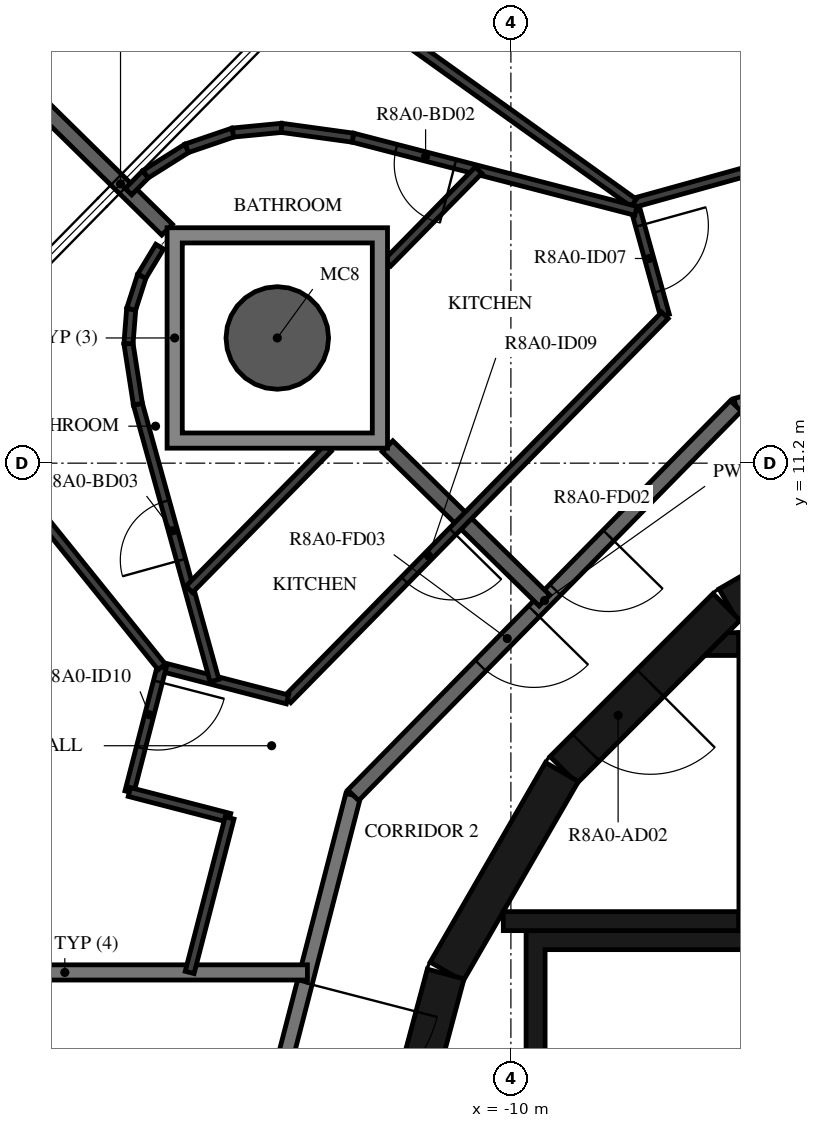
"""IFC4 building model, lengths in metres.
Left out: names, types, materials, properties, quantities, classifications, styles, units other than length and angle.
Written with IfcOpenShell. Run it as: python <this file> out.ifc"""

import sys

from ifc_helpers import new_model, si_unit, direction, frame, frame_2d, origin, origin_2d, place, context, subcontext, project, spatial, polyline, rectangle, hollow_circle, outline, extrude, element, fill, save


model = new_model("IFC4")
c1 = context("Model", 3, precision=1e-05, world=origin(), true_north=direction((0.0, 1.0)))
c2 = subcontext(c1, "Body", "Model", "MODEL_VIEW")
j1 = project(units=[si_unit("LENGTHUNIT", "METRE"), si_unit("PLANEANGLEUNIT", "RADIAN")], contexts=[c1])
p1 = place(None, origin())
s1 = spatial("IfcSite", under=j1, at=p1, CompositionType="ELEMENT")
p2 = place(p1, origin())
s2 = spatial("IfcBuilding", under=s1, at=p2, CompositionType="ELEMENT")
p3 = place(p2, frame((0.0, 0.0, 305.2)))
s3 = spatial("IfcBuildingStorey", under=s2, at=p3, CompositionType="ELEMENT", Elevation=305.2)
p4 = place(p3, frame((-13.073, 12.847, -0.38), z_axis=(0.0, 0.0, 1.0), x_axis=(1.0, 0.0, 0.0)))
e1 = element("IfcColumn", 1, at=p4, inside=s3, PredefinedType="COLUMN", context=c2, shape_type="SweptSolid", body=[
    extrude(hollow_circle(Radius=0.675, WallThickness=0.03, at=origin_2d()), origin(), (0.0, 0.0, 1.0), 3.5),
])
p5 = place(p3, frame((-4.51, 10.845, 0.0), z_axis=(0.0, 0.0, 1.0), x_axis=(-0.865975092491, -0.500087131594, 0.0)))
e2 = element("IfcWall", 2, at=p5, inside=s3, PredefinedType="SHEAR", context=c2, shape_type="SweptSolid", body=[
    extrude(rectangle(XDim=3.033, YDim=0.5, at=frame_2d((1.516, 0.0))), origin(), (0.0, 0.0, 1.0), 3.12),
])
p6 = place(p3, frame((-7.164, 9.308, 0.0), z_axis=(0.0, 0.0, 1.0), x_axis=(-0.707106781187, -0.707106781187, 0.0)))
e3 = element("IfcWall", 3, at=p6, inside=s3, PredefinedType="SHEAR", context=c2, shape_type="SweptSolid", body=[
    extrude(rectangle(XDim=3.032, YDim=0.5, at=frame_2d((1.516, 0.0))), origin(), (0.0, 0.0, 1.0), 3.12),
])
p7 = place(p6, frame((1.416, 0.0, 0.0)))
e4 = element("IfcOpeningElement", 4, at=p7, cuts=e3, PredefinedType="OPENING", context=c2, shape_type="SweptSolid", body=[
    extrude(rectangle(XDim=1.2, YDim=2.1, at=frame_2d((0.6, 1.05))), frame((0.0, 0.26, 0.0), z_axis=(0.0, -1.0, 0.0), x_axis=(1.0, 0.0, 0.0)), (0.0, 0.0, 1.0), 0.52),
])
for number, where, z_axis, x_axis in (
    (5, (-9.329, 7.137, 0.0), (0.0, 0.0, 1.0), (-0.5, -0.866, 0.0)),
    (6, (-10.858, 4.479, 0.0), (0.0, 0.0, 1.0), (-0.259, -0.966, 0.0)),
):
    element("IfcWall", number, at=place(p3, frame(where, z_axis=z_axis, x_axis=x_axis)), inside=s3, PredefinedType="SHEAR", context=c2, shape_type="SweptSolid", body=[
        extrude(rectangle(XDim=3.033, YDim=0.5, at=frame_2d((1.516, 0.0))), origin(), (0.0, 0.0, 1.0), 3.12),
    ])
p8 = place(p3, frame((-6.875, 8.97, 0.0), z_axis=(0.0, 0.0, 1.0), x_axis=(0.0, -1.0, 0.0)))
e7 = element("IfcWall", 7, at=p8, inside=s3, PredefinedType="SHEAR", context=c2, shape_type="SweptSolid", body=[
    extrude(rectangle(XDim=3.92, YDim=0.25, at=frame_2d((1.96, 0.0))), origin(), (0.0, 0.0, 1.0), 3.12),
])
p9 = place(p8, frame((1.61, 0.0, 0.0)))
e8 = element("IfcOpeningElement", 8, at=p9, cuts=e7, PredefinedType="OPENING", context=c2, shape_type="SweptSolid", body=[
    extrude(rectangle(XDim=1.2, YDim=2.1, at=frame_2d((0.6, 1.05))), frame((0.0, 0.135, 0.0), z_axis=(0.0, -1.0, 0.0), x_axis=(1.0, 0.0, 0.0)), (0.0, 0.0, 1.0), 0.27),
])
p10 = place(p3, frame((-7.0, 5.175, 0.0), z_axis=(0.0, 0.0, 1.0), x_axis=(-1.0, 0.0, 0.0)))
e9 = element("IfcWall", 9, at=p10, inside=s3, PredefinedType="SHEAR", context=c2, shape_type="SweptSolid", body=[
    extrude(rectangle(XDim=3.1, YDim=0.25, at=frame_2d((1.55, 0.0))), origin(), (0.0, 0.0, 1.0), 3.12),
])
p11 = place(p3, origin())
e10 = element("IfcWall", 10, at=p11, inside=s3, PredefinedType="SHEAR", context=c2, shape_type="SweptSolid", body=[
    extrude(outline(polyline([(-7.148, 8.97), (-7.0, 8.97), (-7.0, 8.67), (-7.448, 8.67), (-7.148, 8.97)])), origin(), (0.0, 0.0, 1.0), 3.12),
])
p12 = place(p3, origin())
e11 = element("IfcWall", 11, at=p12, inside=s3, PredefinedType="SHEAR", context=c2, shape_type="SweptSolid", body=[
    extrude(outline(polyline([(-9.8, 1.9), (-9.55, 1.9), (-9.55, 4.8), (-1.2, 4.8), (-1.2, 1.9), (-0.95, 1.9), (-0.95, 4.8), (3.1, 4.8), (3.1, 1.9), (3.35, 1.9), (3.35, 4.8), (5.25, 4.8), (5.25, 1.9), (5.5, 1.9), (5.5, 4.8), (7.4, 4.8), (7.4, 1.9), (7.65, 1.9), (7.65, 4.8), (9.55, 4.8), (9.55, 1.9), (9.8, 1.9), (9.8, 4.8), (9.8, 5.05), (-9.8, 5.05), (-9.8, 4.8), (-9.8, 1.9)])), origin(), (0.0, 0.0, 1.0), 3.12),
])
p13 = place(p3, frame((-0.121, 13.872, 0.0), z_axis=(0.0, 0.0, 1.0), x_axis=(-0.963625960674, -0.267254575108, 0.0)))
e12 = element("IfcWall", 12, at=p13, inside=s3, PredefinedType="STANDARD", context=c2, shape_type="SweptSolid", body=[
    extrude(rectangle(XDim=7.181, YDim=0.2, at=frame_2d((3.591, 0.0))), origin(), (0.0, 0.0, 1.0), 3.12),
])
p14 = place(p3, frame((-12.074, 6.831, 0.0), z_axis=(0.0, 0.0, 1.0), x_axis=(-0.250391063186, -0.968144780225, 0.0)))
e13 = element("IfcWall", 13, at=p14, inside=s3, PredefinedType="STANDARD", context=c2, shape_type="SweptSolid", body=[
    extrude(rectangle(XDim=7.181, YDim=0.2, at=frame_2d((3.591, 0.0))), origin(), (0.0, 0.0, 1.0), 3.12),
])
p15 = place(p14, frame((2.548, 0.0, 0.0)))
e14 = element("IfcOpeningElement", 14, at=p15, cuts=e13, PredefinedType="OPENING", context=c2, shape_type="SweptSolid", body=[
    extrude(rectangle(XDim=1.8, YDim=2.1, at=frame_2d((0.9, 1.05))), frame((0.0, 0.11, 0.0), z_axis=(0.0, -1.0, 0.0), x_axis=(1.0, 0.0, 0.0)), (0.0, 0.0, 1.0), 0.22),
])
p16 = place(p3, frame((-7.041, 11.953, 0.0), z_axis=(0.0, 0.0, 1.0), x_axis=(-0.70090916255, -0.713250549143, 0.0)))
e15 = element("IfcWall", 15, at=p16, inside=s3, PredefinedType="STANDARD", context=c2, shape_type="SweptSolid", body=[
    extrude(rectangle(XDim=7.181, YDim=0.2, at=frame_2d((3.59, 0.0))), origin(), (0.0, 0.0, 1.0), 3.12),
])
p17 = place(p16, frame((2.39, 0.0, 0.0)))
e16 = element("IfcOpeningElement", 16, at=p17, cuts=e15, PredefinedType="OPENING", context=c2, shape_type="SweptSolid", body=[
    extrude(rectangle(XDim=1.0, YDim=2.1, at=frame_2d((0.5, 1.05))), frame((0.0, 0.11, 0.0), z_axis=(0.0, -1.0, 0.0), x_axis=(1.0, 0.0, 0.0)), (0.0, 0.0, 1.0), 0.22),
])
p18 = place(p16, frame((3.791, 0.0, 0.0)))
e17 = element("IfcOpeningElement", 17, at=p18, cuts=e15, PredefinedType="OPENING", context=c2, shape_type="SweptSolid", body=[
    extrude(rectangle(XDim=1.0, YDim=2.1, at=frame_2d((0.5, 1.05))), frame((0.0, 0.11, 0.0), z_axis=(0.0, -1.0, 0.0), x_axis=(1.0, 0.0, 0.0)), (0.0, 0.0, 1.0), 0.22),
])
p19 = place(p3, frame((-12.677, 4.5, 0.0), z_axis=(0.0, 0.0, 1.0), x_axis=(-1.0, 0.0, 0.0)))
e18 = element("IfcWall", 18, at=p19, inside=s3, PredefinedType="STANDARD", context=c2, shape_type="SweptSolid", body=[
    extrude(rectangle(XDim=6.383, YDim=0.2, at=frame_2d((3.192, 0.0))), origin(), (0.0, 0.0, 1.0), 3.12),
])
p20 = place(p3, frame((-11.623, 11.422, 0.0), z_axis=(0.0, 0.0, 1.0), x_axis=(0.713233657229, -0.700926351478, 0.0)))
e19 = element("IfcWall", 19, at=p20, inside=s3, PredefinedType="STANDARD", context=c2, shape_type="SweptSolid", body=[
    extrude(rectangle(XDim=2.896, YDim=0.2, at=frame_2d((1.448, 0.0))), origin(), (0.0, 0.0, 1.0), 3.12),
])
p21 = place(p3, frame((-18.741, 18.417, 0.0), z_axis=(0.0, 0.0, 1.0), x_axis=(0.713252414586, -0.700907264256, 0.0)))
e20 = element("IfcWall", 20, at=p21, inside=s3, PredefinedType="STANDARD", context=c2, shape_type="SweptSolid", body=[
    extrude(rectangle(XDim=5.913, YDim=0.2, at=frame_2d((2.957, 0.0))), origin(), (0.0, 0.0, 1.0), 3.12),
])
p22 = place(p3, frame((-6.746, 15.079, 0.0), z_axis=(0.0, 0.0, 1.0), x_axis=(-0.963624820233, -0.267258687102, 0.0)))
e21 = element("IfcWall", 21, at=p22, inside=s3, PredefinedType="PARTITIONING", context=c2, shape_type="SweptSolid", body=[
    extrude(rectangle(XDim=1.7, YDim=0.12, at=frame_2d((0.85, 0.0))), origin(), (0.0, 0.0, 1.0), 3.12),
])
p23 = place(p3, frame((-8.355, 14.519, 0.0), z_axis=(0.0, 0.0, 1.0), x_axis=(0.267052638692, -0.963681943469, 0.0)))
e22 = element("IfcWall", 22, at=p23, inside=s3, PredefinedType="PARTITIONING", context=c2, shape_type="SweptSolid", body=[
    extrude(rectangle(XDim=1.427, YDim=0.12, at=frame_2d((0.713, 0.0))), origin(), (0.0, 0.0, 1.0), 3.12),
])
p24 = place(p23, frame((0.2, 0.0, 0.0)))
e23 = element("IfcOpeningElement", 23, at=p24, cuts=e22, PredefinedType="OPENING", context=c2, shape_type="SweptSolid", body=[
    extrude(rectangle(XDim=0.9, YDim=2.1, at=frame_2d((0.45, 1.05))), frame((0.0, 0.07, 0.0), z_axis=(0.0, -1.0, 0.0), x_axis=(1.0, 0.0, 0.0)), (0.0, 0.0, 1.0), 0.14),
])
p25 = place(p3, frame((-7.974, 13.144, 0.0), z_axis=(0.0, 0.0, 1.0), x_axis=(-0.700910366085, -0.713249366432, 0.0)))
e24 = element("IfcWall", 24, at=p25, inside=s3, PredefinedType="PARTITIONING", context=c2, shape_type="SweptSolid", body=[
    extrude(rectangle(XDim=7.083, YDim=0.12, at=frame_2d((3.542, 0.0))), origin(), (0.0, 0.0, 1.0), 3.12),
])
p26 = place(p25, frame((3.986, 0.0, 0.0)))
e25 = element("IfcOpeningElement", 25, at=p26, cuts=e24, PredefinedType="OPENING", context=c2, shape_type="SweptSolid", body=[
    extrude(rectangle(XDim=0.9, YDim=2.1, at=frame_2d((0.45, 1.05))), frame((0.0, 0.07, 0.0), z_axis=(0.0, -1.0, 0.0), x_axis=(1.0, 0.0, 0.0)), (0.0, 0.0, 1.0), 0.14),
])
p27 = place(p3, frame((-16.165, 20.188, 0.0), z_axis=(0.0, 0.0, 1.0), x_axis=(0.813459166979, -0.581622028175, 0.0)))
e26 = element("IfcWall", 26, at=p27, inside=s3, PredefinedType="PARTITIONING", context=c2, shape_type="SweptSolid", body=[
    extrude(rectangle(XDim=9.565, YDim=0.12, at=frame_2d((4.782, 0.0))), origin(), (0.0, 0.0, 1.0), 3.12),
])
p28 = place(p27, frame((0.5, 0.0, 0.0)))
e27 = element("IfcOpeningElement", 27, at=p28, cuts=e26, PredefinedType="OPENING", context=c2, shape_type="SweptSolid", body=[
    extrude(rectangle(XDim=0.9, YDim=2.1, at=frame_2d((0.45, 1.05))), frame((0.0, 0.07, 0.0), z_axis=(0.0, -1.0, 0.0), x_axis=(1.0, 0.0, 0.0)), (0.0, 0.0, 1.0), 0.14),
])
p29 = place(p3, frame((-8.355, 14.519, 0.0), z_axis=(0.0, 0.0, 1.0), x_axis=(-0.968146911612, 0.250382821969, 0.0)))
e28 = element("IfcWall", 28, at=p29, inside=s3, PredefinedType="PARTITIONING", context=c2, shape_type="SweptSolid", body=[
    extrude(rectangle(XDim=3.847, YDim=0.12, at=frame_2d((1.923, 0.0))), origin(), (0.0, 0.0, 1.0), 3.12),
])
p30 = place(p29, frame((2.458, 0.0, 0.0)))
e29 = element("IfcOpeningElement", 29, at=p30, cuts=e28, PredefinedType="OPENING", context=c2, shape_type="SweptSolid", body=[
    extrude(rectangle(XDim=0.8, YDim=2.1, at=frame_2d((0.4, 1.05))), frame((0.0, 0.07, 0.0), z_axis=(0.0, -1.0, 0.0), x_axis=(1.0, 0.0, 0.0)), (0.0, 0.0, 1.0), 0.14),
])
p31 = place(p3, frame((-10.425, 15.054, 0.0), z_axis=(0.0, 0.0, 1.0), x_axis=(-0.700866383264, -0.713292585698, 0.0)))
e30 = element("IfcWall", 30, at=p31, inside=s3, PredefinedType="PARTITIONING", context=c2, shape_type="SweptSolid", body=[
    extrude(rectangle(XDim=1.709, YDim=0.12, at=frame_2d((0.854, 0.0))), origin(), (0.0, 0.0, 1.0), 3.12),
])
p32 = place(p3, frame((-15.032, 14.772, 0.0), z_axis=(0.0, 0.0, 1.0), x_axis=(0.701378407906, 0.712789119532, 0.0)))
e31 = element("IfcWall", 31, at=p32, inside=s3, PredefinedType="PARTITIONING", context=c2, shape_type="SweptSolid", body=[
    extrude(rectangle(XDim=0.321, YDim=0.12, at=frame_2d((0.161, 0.0))), origin(), (0.0, 0.0, 1.0), 3.12),
])
p33 = place(p3, frame((-14.807, 15.0, 0.0), z_axis=(0.0, 0.0, 1.0), x_axis=(0.846499451836, 0.532389592349, 0.0)))
e32 = element("IfcWall", 32, at=p33, inside=s3, PredefinedType="PARTITIONING", context=c2, shape_type="SweptSolid", body=[
    extrude(rectangle(XDim=0.642, YDim=0.12, at=frame_2d((0.321, 0.0))), origin(), (0.0, 0.0, 1.0), 3.12),
])
for number, where, z_axis, x_axis in (
    (33, (-14.263, 15.342, 0.0), (0.0, 0.0, 1.0), (0.946, 0.323, 0.0)),
    (34, (-13.656, 15.55, 0.0), (0.0, 0.0, 1.0), (0.995, 0.096, 0.0)),
):
    element("IfcWall", number, at=place(p3, frame(where, z_axis=z_axis, x_axis=x_axis)), inside=s3, PredefinedType="PARTITIONING", context=c2, shape_type="SweptSolid", body=[
        extrude(rectangle(XDim=0.642, YDim=0.12, at=frame_2d((0.321, 0.0))), origin(), (0.0, 0.0, 1.0), 3.12),
    ])
p34 = place(p3, frame((-13.017, 15.611, 0.0), z_axis=(0.0, 0.0, 1.0), x_axis=(0.990688406717, -0.136148745119, 0.0)))
e35 = element("IfcWall", 35, at=p34, inside=s3, PredefinedType="PARTITIONING", context=c2, shape_type="SweptSolid", body=[
    extrude(rectangle(XDim=0.947, YDim=0.12, at=frame_2d((0.473, 0.0))), origin(), (0.0, 0.0, 1.0), 3.12),
])
p35 = place(p3, frame((-12.939, 8.092, 0.0), z_axis=(0.0, 0.0, 1.0), x_axis=(-0.968179141411, 0.250258166974, 0.0)))
e36 = element("IfcWall", 36, at=p35, inside=s3, PredefinedType="PARTITIONING", context=c2, shape_type="SweptSolid", body=[
    extrude(rectangle(XDim=1.709, YDim=0.12, at=frame_2d((0.854, 0.0))), origin(), (0.0, 0.0, 1.0), 3.12),
])
p36 = place(p3, frame((-14.594, 8.519, 0.0), z_axis=(0.0, 0.0, 1.0), x_axis=(-0.250468695288, -0.968124698931, 0.0)))
e37 = element("IfcWall", 37, at=p36, inside=s3, PredefinedType="PARTITIONING", context=c2, shape_type="SweptSolid", body=[
    extrude(rectangle(XDim=1.7, YDim=0.12, at=frame_2d((0.85, 0.0))), origin(), (0.0, 0.0, 1.0), 3.12),
])
p37 = place(p36, frame((0.2, 0.0, 0.0)))
e38 = element("IfcOpeningElement", 38, at=p37, cuts=e37, PredefinedType="OPENING", context=c2, shape_type="SweptSolid", body=[
    extrude(rectangle(XDim=0.9, YDim=2.1, at=frame_2d((0.45, 1.05))), frame((0.0, 0.07, 0.0), z_axis=(0.0, -1.0, 0.0), x_axis=(1.0, 0.0, 0.0)), (0.0, 0.0, 1.0), 0.14),
])
p38 = place(p3, frame((-15.019, 6.874, 0.0), z_axis=(0.0, 0.0, 1.0), x_axis=(0.968182114673, -0.250246663967, 0.0)))
e39 = element("IfcWall", 39, at=p38, inside=s3, PredefinedType="PARTITIONING", context=c2, shape_type="SweptSolid", body=[
    extrude(rectangle(XDim=1.362, YDim=0.12, at=frame_2d((0.681, 0.0))), origin(), (0.0, 0.0, 1.0), 3.12),
])
p39 = place(p3, frame((-13.701, 6.533, 0.0), z_axis=(0.0, 0.0, 1.0), x_axis=(-0.250352755349, -0.968154686963, 0.0)))
e40 = element("IfcWall", 40, at=p39, inside=s3, PredefinedType="PARTITIONING", context=c2, shape_type="SweptSolid", body=[
    extrude(rectangle(XDim=2.1, YDim=0.12, at=frame_2d((1.05, 0.0))), origin(), (0.0, 0.0, 1.0), 3.12),
])
p40 = place(p3, frame((-13.899, 8.34, 0.0), z_axis=(0.0, 0.0, 1.0), x_axis=(-0.267286775597, 0.963617029525, 0.0)))
e41 = element("IfcWall", 41, at=p40, inside=s3, PredefinedType="PARTITIONING", context=c2, shape_type="SweptSolid", body=[
    extrude(rectangle(XDim=3.773, YDim=0.12, at=frame_2d((1.887, 0.0))), origin(), (0.0, 0.0, 1.0), 3.12),
])
p41 = place(p40, frame((1.646, 0.0, 0.0)))
e42 = element("IfcOpeningElement", 42, at=p41, cuts=e41, PredefinedType="OPENING", context=c2, shape_type="SweptSolid", body=[
    extrude(rectangle(XDim=0.8, YDim=2.1, at=frame_2d((0.4, 1.05))), frame((0.0, 0.07, 0.0), z_axis=(0.0, -1.0, 0.0), x_axis=(1.0, 0.0, 0.0)), (0.0, 0.0, 1.0), 0.14),
])
p42 = place(p3, frame((-14.907, 11.976, 0.0), z_axis=(0.0, 0.0, 1.0), x_axis=(-0.153398456533, 0.988164416245, 0.0)))
e43 = element("IfcWall", 43, at=p42, inside=s3, PredefinedType="PARTITIONING", context=c2, shape_type="SweptSolid", body=[
    extrude(rectangle(XDim=0.807, YDim=0.12, at=frame_2d((0.403, 0.0))), origin(), (0.0, 0.0, 1.0), 3.12),
])
for number, where, z_axis, x_axis in (
    (44, (-15.031, 12.773, 0.0), (0.0, 0.0, 1.0), (0.078, 0.997, 0.0)),
    (45, (-14.995, 13.227, 0.0), (0.0, 0.0, 1.0), (0.306, 0.952, 0.0)),
    (46, (-14.856, 13.66, 0.0), (0.0, 0.0, 1.0), (0.518, 0.855, 0.0)),
):
    element("IfcWall", number, at=place(p3, frame(where, z_axis=z_axis, x_axis=x_axis)), inside=s3, PredefinedType="PARTITIONING", context=c2, shape_type="SweptSolid", body=[
        extrude(rectangle(XDim=0.455, YDim=0.12, at=frame_2d((0.228, 0.0))), origin(), (0.0, 0.0, 1.0), 3.12),
    ])
p43 = place(p3, frame((-20.466, 15.812, 0.0), z_axis=(0.0, 0.0, 1.0), x_axis=(0.62719424473, -0.77886287585, 0.0)))
e47 = element("IfcWall", 47, at=p43, inside=s3, PredefinedType="PARTITIONING", context=c2, shape_type="SweptSolid", body=[
    extrude(rectangle(XDim=9.364, YDim=0.12, at=frame_2d((4.682, 0.0))), origin(), (0.0, 0.0, 1.0), 3.12),
])
p44 = place(p43, frame((0.5, 0.0, 0.0)))
e48 = element("IfcOpeningElement", 48, at=p44, cuts=e47, PredefinedType="OPENING", context=c2, shape_type="SweptSolid", body=[
    extrude(rectangle(XDim=0.9, YDim=2.1, at=frame_2d((0.45, 1.05))), frame((0.0, 0.07, 0.0), z_axis=(0.0, -1.0, 0.0), x_axis=(1.0, 0.0, 0.0)), (0.0, 0.0, 1.0), 0.14),
])
p45 = place(p3, frame((-14.232, 9.54, 0.0), z_axis=(0.0, 0.0, 1.0), x_axis=(0.700890401548, 0.713268985038, 0.0)))
e49 = element("IfcWall", 49, at=p45, inside=s3, PredefinedType="PARTITIONING", context=c2, shape_type="SweptSolid", body=[
    extrude(rectangle(XDim=2.604, YDim=0.12, at=frame_2d((1.302, 0.0))), origin(), (0.0, 0.0, 1.0), 3.12),
])
p46 = place(p3, origin())
e50 = element("IfcWall", 50, at=p46, inside=s3, PredefinedType="STANDARD", context=c2, shape_type="SweptSolid", body=[
    extrude(outline(polyline([(-11.623, 14.297), (-11.623, 11.397), (-14.523, 11.397), (-14.523, 14.297), (-11.623, 14.297)]), holes=[polyline([(-14.323, 11.597), (-11.823, 11.597), (-11.823, 14.097), (-14.323, 14.097), (-14.323, 11.597)])]), origin(), (0.0, 0.0, 1.0), 3.12),
])
p47 = place(p7, origin())
e51 = element("IfcDoor", 51, at=p47, inside=s3, OperationType="SINGLE_SWING_RIGHT", PredefinedType="DOOR", context=c2, shape_type="SweptSolid", body=[
    extrude(rectangle(XDim=1.2, YDim=2.1, at=frame_2d((0.6, 1.05))), frame((0.0, 0.025, 0.0), z_axis=(0.0, -1.0, 0.0), x_axis=(1.0, 0.0, 0.0)), (0.0, 0.0, 1.0), 0.05),
])
fill(e4, e51)
p48 = place(p17, origin())
e52 = element("IfcDoor", 52, at=p48, inside=s3, OperationType="SINGLE_SWING_RIGHT", PredefinedType="DOOR", context=c2, shape_type="SweptSolid", body=[
    extrude(rectangle(XDim=1.0, YDim=2.1, at=frame_2d((0.5, 1.05))), frame((0.0, 0.025, 0.0), z_axis=(0.0, -1.0, 0.0), x_axis=(1.0, 0.0, 0.0)), (0.0, 0.0, 1.0), 0.05),
])
fill(e16, e52)
p49 = place(p24, origin())
e53 = element("IfcDoor", 53, at=p49, inside=s3, OperationType="SINGLE_SWING_LEFT", PredefinedType="DOOR", context=c2, shape_type="SweptSolid", body=[
    extrude(rectangle(XDim=0.9, YDim=2.1, at=frame_2d((0.45, 1.05))), frame((0.0, 0.025, 0.0), z_axis=(0.0, -1.0, 0.0), x_axis=(1.0, 0.0, 0.0)), (0.0, 0.0, 1.0), 0.05),
])
fill(e23, e53)
p50 = place(p30, origin())
e54 = element("IfcDoor", 54, at=p50, inside=s3, OperationType="SINGLE_SWING_LEFT", PredefinedType="DOOR", context=c2, shape_type="SweptSolid", body=[
    extrude(rectangle(XDim=0.8, YDim=2.1, at=frame_2d((0.4, 1.05))), frame((0.0, 0.025, 0.0), z_axis=(0.0, -1.0, 0.0), x_axis=(1.0, 0.0, 0.0)), (0.0, 0.0, 1.0), 0.05),
])
fill(e29, e54)
p51 = place(p18, origin())
e55 = element("IfcDoor", 55, at=p51, inside=s3, OperationType="SINGLE_SWING_LEFT", PredefinedType="DOOR", context=c2, shape_type="SweptSolid", body=[
    extrude(rectangle(XDim=1.0, YDim=2.1, at=frame_2d((0.5, 1.05))), frame((0.0, 0.025, 0.0), z_axis=(0.0, -1.0, 0.0), x_axis=(1.0, 0.0, 0.0)), (0.0, 0.0, 1.0), 0.05),
])
fill(e17, e55)
p52 = place(p26, origin())
e56 = element("IfcDoor", 56, at=p52, inside=s3, OperationType="SINGLE_SWING_LEFT", PredefinedType="DOOR", context=c2, shape_type="SweptSolid", body=[
    extrude(rectangle(XDim=0.9, YDim=2.1, at=frame_2d((0.45, 1.05))), frame((0.0, 0.025, 0.0), z_axis=(0.0, -1.0, 0.0), x_axis=(1.0, 0.0, 0.0)), (0.0, 0.0, 1.0), 0.05),
])
fill(e25, e56)
p53 = place(p37, origin())
e57 = element("IfcDoor", 57, at=p53, inside=s3, OperationType="SINGLE_SWING_LEFT", PredefinedType="DOOR", context=c2, shape_type="SweptSolid", body=[
    extrude(rectangle(XDim=0.9, YDim=2.1, at=frame_2d((0.45, 1.05))), frame((0.0, 0.025, 0.0), z_axis=(0.0, -1.0, 0.0), x_axis=(1.0, 0.0, 0.0)), (0.0, 0.0, 1.0), 0.05),
])
fill(e38, e57)
p54 = place(p41, origin())
e58 = element("IfcDoor", 58, at=p54, inside=s3, OperationType="SINGLE_SWING_RIGHT", PredefinedType="DOOR", context=c2, shape_type="SweptSolid", body=[
    extrude(rectangle(XDim=0.8, YDim=2.1, at=frame_2d((0.4, 1.05))), frame((0.0, 0.025, 0.0), z_axis=(0.0, -1.0, 0.0), x_axis=(1.0, 0.0, 0.0)), (0.0, 0.0, 1.0), 0.05),
])
fill(e42, e58)
p55 = place(p15, origin())
e59 = element("IfcDoor", 59, at=p55, inside=s3, OperationType="DOUBLE_DOOR_SINGLE_SWING", PredefinedType="DOOR", context=c2, shape_type="SweptSolid", body=[
    extrude(rectangle(XDim=1.8, YDim=2.1, at=frame_2d((0.9, 1.05))), frame((0.0, 0.025, 0.0), z_axis=(0.0, -1.0, 0.0), x_axis=(1.0, 0.0, 0.0)), (0.0, 0.0, 1.0), 0.05),
])
fill(e14, e59)
save(model, sys.argv[1])
